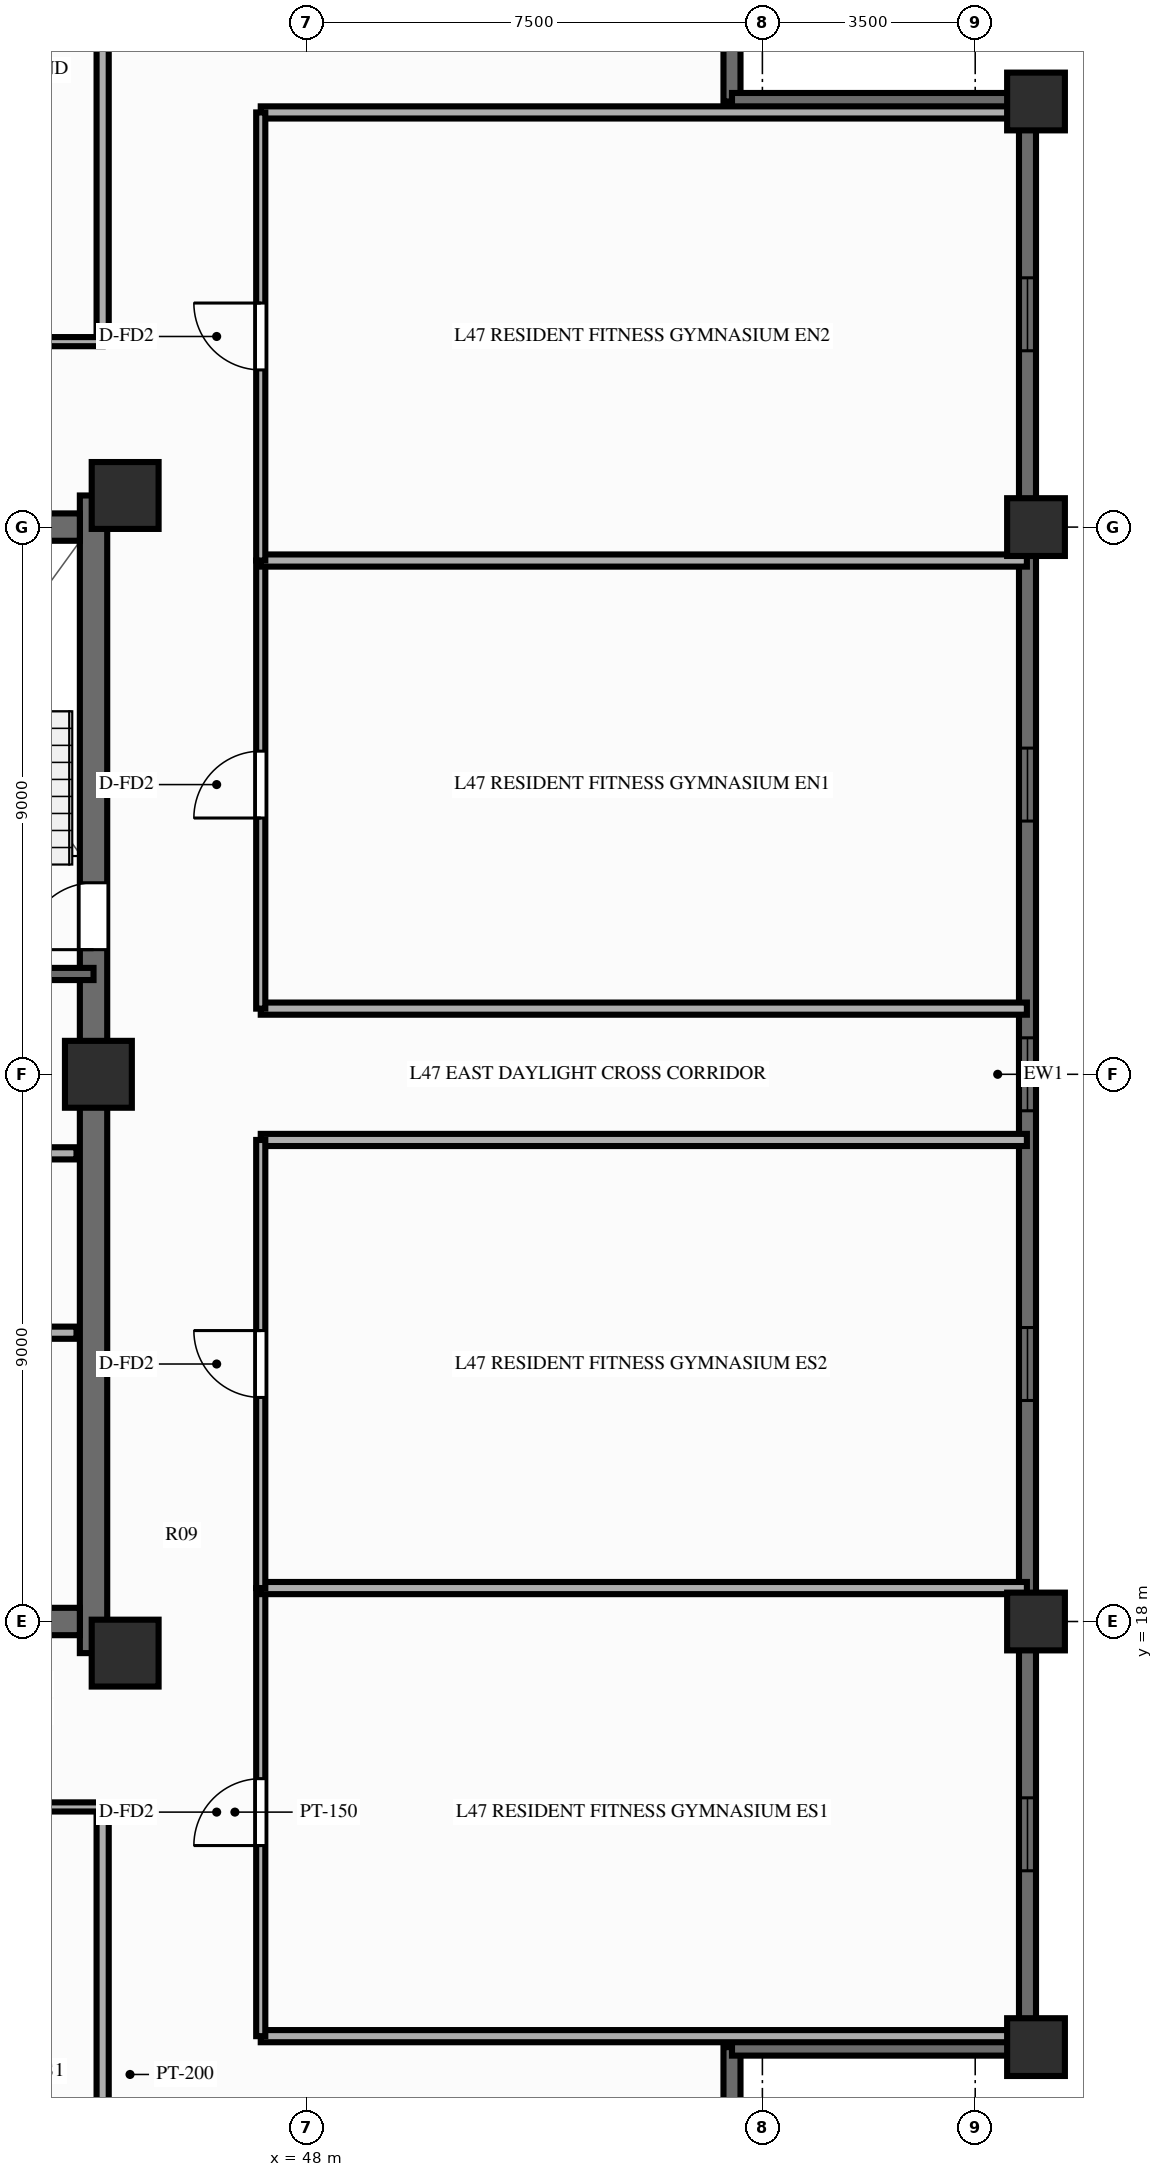
"""IFC4 building model, lengths in metres.
Left out: names, types, materials, properties, quantities, classifications, styles, units other than length and angle.
Written with IfcOpenShell. Run it as: python <this file> out.ifc"""

import sys

from ifc_helpers import new_model, si_unit, direction, frame, frame_2d, origin, origin_2d, place, context, subcontext, project, spatial, rectangle, extrude, source, transform, mapped, element, fill, save


model = new_model("IFC4")
c1 = context("Model", 3, precision=1e-05, world=origin(), true_north=direction((0.0, 1.0)))
c2 = subcontext(c1, "Body", "Model", "MODEL_VIEW")
j1 = project(units=[si_unit("LENGTHUNIT", "METRE"), si_unit("PLANEANGLEUNIT", "RADIAN")], contexts=[c1])
p1 = place(None, origin())
s1 = spatial("IfcSite", under=j1, at=p1, CompositionType="ELEMENT")
p2 = place(p1, origin())
s2 = spatial("IfcBuilding", under=s1, at=p2, CompositionType="ELEMENT")
p3 = place(p2, frame((0.0, 0.0, 148.7)))
s3 = spatial("IfcBuildingStorey", under=s2, at=p3, CompositionType="ELEMENT", Elevation=148.7)
p4 = place(p3, frame((44.5, 17.48, 0.0), z_axis=(0.0, 0.0, 1.0), x_axis=(0.0, 1.0, 0.0)))
e1 = element("IfcWall", 1, at=p4, inside=s3, PredefinedType="SHEAR", context=c2, shape_type="SweptSolid", body=[
    extrude(rectangle(XDim=19.04, YDim=0.45, at=frame_2d((9.52, 0.0))), origin(), (0.0, 0.0, 1.0), 3.5),
])
p5 = place(p4, frame((12.67, 0.0, 0.0), z_axis=(0.0, 0.0, 1.0), x_axis=(-1.0, 0.0, 0.0)))
e2 = element("IfcOpeningElement", 2, at=p5, cuts=e1, PredefinedType="OPENING", context=c2, shape_type="SweptSolid", body=[
    extrude(rectangle(XDim=1.1, YDim=2.15, at=frame_2d((0.55, 1.075))), frame((0.0, 0.237, 0.0), z_axis=(0.0, -1.0, 0.0), x_axis=(1.0, 0.0, 0.0)), (0.0, 0.0, 1.0), 0.474),
])
p6 = place(p3, frame((31.725, 18.0, 0.0), z_axis=(0.0, 0.0, 1.0), x_axis=(1.0, 0.0, 0.0)))
e3 = element("IfcWall", 3, at=p6, inside=s3, PredefinedType="SHEAR", context=c2, shape_type="SweptSolid", body=[
    extrude(rectangle(XDim=12.55, YDim=0.45, at=frame_2d((6.275, 0.0))), origin(), (0.0, 0.0, 1.0), 3.5),
])
p7 = place(p3, frame((31.725, 36.0, 0.0), z_axis=(0.0, 0.0, 1.0), x_axis=(1.0, 0.0, 0.0)))
e4 = element("IfcWall", 4, at=p7, inside=s3, PredefinedType="SHEAR", context=c2, shape_type="SweptSolid", body=[
    extrude(rectangle(XDim=12.55, YDim=0.45, at=frame_2d((6.275, 0.0))), origin(), (0.0, 0.0, 1.0), 3.5),
])
p8 = place(p7, frame((5.225, 0.0, 0.0), z_axis=(0.0, 0.0, 1.0), x_axis=(-1.0, 0.0, 0.0)))
e5 = element("IfcOpeningElement", 5, at=p8, cuts=e4, PredefinedType="OPENING", context=c2, shape_type="SweptSolid", body=[
    extrude(rectangle(XDim=1.4, YDim=2.15, at=frame_2d((0.7, 1.075))), frame((0.0, 0.237, 0.0), z_axis=(0.0, -1.0, 0.0), x_axis=(1.0, 0.0, 0.0)), (0.0, 0.0, 1.0), 0.474),
])
m1 = source(origin(), c2, "Body", "SweptSolid", [
    extrude(rectangle(XDim=1.1, YDim=1.1, at=origin_2d()), origin(), (0.0, 0.0, 1.0), 3.5),
])
for number, where, z_axis, x_axis in (
    (6, (45.02, 17.48, 0.0), (0.0, 0.0, 1.0), (1.0, 0.0, 0.0)),
    (7, (45.02, 36.52, 0.0), (0.0, 0.0, 1.0), (1.0, 0.0, 0.0)),
    (8, (44.58, 27.0, 0.0), (0.0, 0.0, 1.0), (1.0, 0.0, 0.0)),
):
    element("IfcColumn", number, at=place(p3, frame(where, z_axis=z_axis, x_axis=x_axis)), inside=s3, PredefinedType="COLUMN", context=c2, shape_type="MappedRepresentation", body=[
        mapped(m1, transform((0.0, 0.0, 0.0), scale=1.0)),
    ])
m2 = source(origin(), c2, "Body", "SweptSolid", [
    extrude(rectangle(XDim=0.95, YDim=0.95, at=origin_2d()), origin(), (0.0, 0.0, 1.0), 3.5),
])
for number, where, z_axis, x_axis in (
    (9, (60.0, 11.0, 0.0), (0.0, 0.0, 1.0), (1.0, 0.0, 0.0)),
    (10, (60.0, 18.0, 0.0), (0.0, 0.0, 1.0), (1.0, 0.0, 0.0)),
    (11, (60.0, 36.0, 0.0), (0.0, 0.0, 1.0), (1.0, 0.0, 0.0)),
    (12, (60.0, 43.0, 0.0), (0.0, 0.0, 1.0), (1.0, 0.0, 0.0)),
):
    element("IfcColumn", number, at=place(p3, frame(where, z_axis=z_axis, x_axis=x_axis)), inside=s3, PredefinedType="COLUMN", context=c2, shape_type="MappedRepresentation", body=[
        mapped(m2, transform((0.0, 0.0, 0.0), scale=1.0)),
    ])
p9 = place(p3, frame((59.86, 11.0, 0.0), z_axis=(0.0, 0.0, 1.0), x_axis=(0.0, 1.0, 0.0)))
e13 = element("IfcWall", 13, at=p9, inside=s3, PredefinedType="SOLIDWALL", context=c2, shape_type="SweptSolid", body=[
    extrude(rectangle(XDim=32.0, YDim=0.28, at=frame_2d((16.0, 0.0))), origin(), (0.0, 0.0, 1.0), 2.39),
])
p10 = place(p9, frame((2.9, 0.0, 0.25)))
e14 = element("IfcOpeningElement", 14, at=p10, cuts=e13, PredefinedType="OPENING", context=c2, shape_type="SweptSolid", body=[
    extrude(rectangle(XDim=1.2, YDim=1.5, at=frame_2d((0.6, 0.75))), frame((0.0, 0.152, 0.0), z_axis=(0.0, -1.0, 0.0), x_axis=(1.0, 0.0, 0.0)), (0.0, 0.0, 1.0), 0.304),
])
p11 = place(p9, frame((10.635, 0.0, 0.25)))
e15 = element("IfcOpeningElement", 15, at=p11, cuts=e13, PredefinedType="OPENING", context=c2, shape_type="SweptSolid", body=[
    extrude(rectangle(XDim=1.2, YDim=1.5, at=frame_2d((0.6, 0.75))), frame((0.0, 0.152, 0.0), z_axis=(0.0, -1.0, 0.0), x_axis=(1.0, 0.0, 0.0)), (0.0, 0.0, 1.0), 0.304),
])
p12 = place(p9, frame((15.4, 0.0, 0.25)))
e16 = element("IfcOpeningElement", 16, at=p12, cuts=e13, PredefinedType="OPENING", context=c2, shape_type="SweptSolid", body=[
    extrude(rectangle(XDim=1.2, YDim=1.5, at=frame_2d((0.6, 0.75))), frame((0.0, 0.152, 0.0), z_axis=(0.0, -1.0, 0.0), x_axis=(1.0, 0.0, 0.0)), (0.0, 0.0, 1.0), 0.304),
])
p13 = place(p9, frame((20.165, 0.0, 0.25)))
e17 = element("IfcOpeningElement", 17, at=p13, cuts=e13, PredefinedType="OPENING", context=c2, shape_type="SweptSolid", body=[
    extrude(rectangle(XDim=1.2, YDim=1.5, at=frame_2d((0.6, 0.75))), frame((0.0, 0.152, 0.0), z_axis=(0.0, -1.0, 0.0), x_axis=(1.0, 0.0, 0.0)), (0.0, 0.0, 1.0), 0.304),
])
p14 = place(p9, frame((27.9, 0.0, 0.25)))
e18 = element("IfcOpeningElement", 18, at=p14, cuts=e13, PredefinedType="OPENING", context=c2, shape_type="SweptSolid", body=[
    extrude(rectangle(XDim=1.2, YDim=1.5, at=frame_2d((0.6, 0.75))), frame((0.0, 0.152, 0.0), z_axis=(0.0, -1.0, 0.0), x_axis=(1.0, 0.0, 0.0)), (0.0, 0.0, 1.0), 0.304),
])
for number, where, z_axis, x_axis in (
    (19, (55.0, 6.08, 0.0), (0.0, 0.0, 1.0), (0.0, 1.0, 0.0)),
    (20, (55.0, 11.0, 0.0), (0.0, 0.0, 1.0), (1.0, 0.0, 0.0)),
    (21, (55.0, 43.0, 0.0), (0.0, 0.0, 1.0), (0.0, 1.0, 0.0)),
    (22, (55.0, 43.0, 0.0), (0.0, 0.0, 1.0), (1.0, 0.0, 0.0)),
):
    element("IfcWall", number, at=place(p3, frame(where, z_axis=z_axis, x_axis=x_axis)), inside=s3, PredefinedType="SOLIDWALL", context=c2, shape_type="SweptSolid", body=[
        extrude(rectangle(XDim=4.92, YDim=0.28, at=frame_2d((2.46, 0.0))), origin(), (0.0, 0.0, 1.0), 2.39),
    ])
p15 = place(p3, frame((41.55, 22.75, 0.0), z_axis=(0.0, 0.0, 1.0), x_axis=(1.0, 0.0, 0.0)))
e23 = element("IfcWall", 23, at=p15, inside=s3, PredefinedType="PARTITIONING", context=c2, shape_type="SweptSolid", body=[
    extrude(rectangle(XDim=2.67, YDim=0.2, at=frame_2d((1.335, 0.0))), origin(), (0.0, 0.0, 1.0), 3.16),
])
p16 = place(p3, frame((41.55, 25.7, 0.0), z_axis=(0.0, 0.0, 1.0), x_axis=(1.0, 0.0, 0.0)))
e24 = element("IfcWall", 24, at=p16, inside=s3, PredefinedType="PARTITIONING", context=c2, shape_type="SweptSolid", body=[
    extrude(rectangle(XDim=2.67, YDim=0.2, at=frame_2d((1.335, 0.0))), origin(), (0.0, 0.0, 1.0), 2.64),
])
p17 = place(p3, frame((40.57, 28.65, 0.0), z_axis=(0.0, 0.0, 1.0), x_axis=(1.0, 0.0, 0.0)))
e25 = element("IfcWall", 25, at=p17, inside=s3, PredefinedType="SOLIDWALL", context=c2, shape_type="SweptSolid", body=[
    extrude(rectangle(XDim=3.93, YDim=0.2, at=frame_2d((1.965, 0.0))), origin(), (0.0, 0.0, 1.0), 3.29),
])
p18 = place(p3, frame((44.65, 14.95, 0.0), z_axis=(0.0, 0.0, 1.0), x_axis=(0.0, -1.0, 0.0)))
e26 = element("IfcWall", 26, at=p18, inside=s3, PredefinedType="PARTITIONING", context=c2, shape_type="SweptSolid", body=[
    extrude(rectangle(XDim=8.8, YDim=0.2, at=frame_2d((4.4, 0.0))), origin(), (0.0, 0.0, 1.0), 2.39),
])
p19 = place(p3, frame((36.25, 14.95, 0.0), z_axis=(0.0, 0.0, 1.0), x_axis=(1.0, 0.0, 0.0)))
e27 = element("IfcWall", 27, at=p19, inside=s3, PredefinedType="PARTITIONING", context=c2, shape_type="SweptSolid", body=[
    extrude(rectangle(XDim=8.4, YDim=0.15, at=frame_2d((4.2, 0.0))), origin(), (0.0, 0.0, 1.0), 3.16),
])
p20 = place(p19, frame((3.367, 0.0, 0.0)))
e28 = element("IfcOpeningElement", 28, at=p20, cuts=e27, PredefinedType="OPENING", context=c2, shape_type="SweptSolid", body=[
    extrude(rectangle(XDim=1.1, YDim=2.15, at=frame_2d((0.55, 1.075))), frame((0.0, 0.087, 0.0), z_axis=(0.0, -1.0, 0.0), x_axis=(1.0, 0.0, 0.0)), (0.0, 0.0, 1.0), 0.174),
])
p21 = place(p3, frame((44.65, 39.05, 0.0), z_axis=(0.0, 0.0, 1.0), x_axis=(0.0, 1.0, 0.0)))
e29 = element("IfcWall", 29, at=p21, inside=s3, PredefinedType="PARTITIONING", context=c2, shape_type="SweptSolid", body=[
    extrude(rectangle(XDim=8.8, YDim=0.2, at=frame_2d((4.4, 0.0))), origin(), (0.0, 0.0, 1.0), 2.39),
])
p22 = place(p3, frame((38.4, 39.05, 0.0), z_axis=(0.0, 0.0, 1.0), x_axis=(1.0, 0.0, 0.0)))
e30 = element("IfcWall", 30, at=p22, inside=s3, PredefinedType="PARTITIONING", context=c2, shape_type="SweptSolid", body=[
    extrude(rectangle(XDim=6.25, YDim=0.15, at=frame_2d((3.125, 0.0))), origin(), (0.0, 0.0, 1.0), 3.16),
])
p23 = place(p22, frame((2.382, 0.0, 0.0)))
e31 = element("IfcOpeningElement", 31, at=p23, cuts=e30, PredefinedType="OPENING", context=c2, shape_type="SweptSolid", body=[
    extrude(rectangle(XDim=1.1, YDim=2.15, at=frame_2d((0.55, 1.075))), frame((0.0, 0.087, 0.0), z_axis=(0.0, -1.0, 0.0), x_axis=(1.0, 0.0, 0.0)), (0.0, 0.0, 1.0), 0.174),
])
for number, where, z_axis, x_axis in (
    (32, (47.25, 11.18, 0.0), (0.0, 0.0, 1.0), (1.0, 0.0, 0.0)),
    (33, (47.25, 25.92, 0.0), (0.0, 0.0, 1.0), (1.0, 0.0, 0.0)),
):
    element("IfcWall", number, at=place(p3, frame(where, z_axis=z_axis, x_axis=x_axis)), inside=s3, PredefinedType="PARTITIONING", context=c2, shape_type="SweptSolid", body=[
        extrude(rectangle(XDim=12.6, YDim=0.2, at=frame_2d((6.3, 0.0))), origin(), (0.0, 0.0, 1.0), 3.16),
    ])
p24 = place(p3, frame((47.25, 11.18, 0.0), z_axis=(0.0, 0.0, 1.0), x_axis=(0.0, 1.0, 0.0)))
e34 = element("IfcWall", 34, at=p24, inside=s3, PredefinedType="PARTITIONING", context=c2, shape_type="SweptSolid", body=[
    extrude(rectangle(XDim=7.37, YDim=0.15, at=frame_2d((3.685, 0.0))), origin(), (0.0, 0.0, 1.0), 3.16),
])
p25 = place(p24, frame((3.135, 0.0, 0.0)))
e35 = element("IfcOpeningElement", 35, at=p25, cuts=e34, PredefinedType="OPENING", context=c2, shape_type="SweptSolid", body=[
    extrude(rectangle(XDim=1.1, YDim=2.15, at=frame_2d((0.55, 1.075))), frame((0.0, 0.087, 0.0), z_axis=(0.0, -1.0, 0.0), x_axis=(1.0, 0.0, 0.0)), (0.0, 0.0, 1.0), 0.174),
])
p26 = place(p3, frame((47.25, 18.55, 0.0), z_axis=(0.0, 0.0, 1.0), x_axis=(1.0, 0.0, 0.0)))
e36 = element("IfcWall", 36, at=p26, inside=s3, PredefinedType="PARTITIONING", context=c2, shape_type="SweptSolid", body=[
    extrude(rectangle(XDim=12.6, YDim=0.2, at=frame_2d((6.3, 0.0))), origin(), (0.0, 0.0, 1.0), 3.16),
])
p27 = place(p3, frame((47.25, 18.55, 0.0), z_axis=(0.0, 0.0, 1.0), x_axis=(0.0, 1.0, 0.0)))
e37 = element("IfcWall", 37, at=p27, inside=s3, PredefinedType="PARTITIONING", context=c2, shape_type="SweptSolid", body=[
    extrude(rectangle(XDim=7.37, YDim=0.15, at=frame_2d((3.685, 0.0))), origin(), (0.0, 0.0, 1.0), 3.16),
])
p28 = place(p27, frame((3.135, 0.0, 0.0)))
e38 = element("IfcOpeningElement", 38, at=p28, cuts=e37, PredefinedType="OPENING", context=c2, shape_type="SweptSolid", body=[
    extrude(rectangle(XDim=1.1, YDim=2.15, at=frame_2d((0.55, 1.075))), frame((0.0, 0.087, 0.0), z_axis=(0.0, -1.0, 0.0), x_axis=(1.0, 0.0, 0.0)), (0.0, 0.0, 1.0), 0.174),
])
for number, where, z_axis, x_axis in (
    (39, (47.25, 28.08, 0.0), (0.0, 0.0, 1.0), (1.0, 0.0, 0.0)),
    (40, (47.25, 42.82, 0.0), (0.0, 0.0, 1.0), (1.0, 0.0, 0.0)),
):
    element("IfcWall", number, at=place(p3, frame(where, z_axis=z_axis, x_axis=x_axis)), inside=s3, PredefinedType="PARTITIONING", context=c2, shape_type="SweptSolid", body=[
        extrude(rectangle(XDim=12.6, YDim=0.2, at=frame_2d((6.3, 0.0))), origin(), (0.0, 0.0, 1.0), 3.16),
    ])
p29 = place(p3, frame((47.25, 28.08, 0.0), z_axis=(0.0, 0.0, 1.0), x_axis=(0.0, 1.0, 0.0)))
e41 = element("IfcWall", 41, at=p29, inside=s3, PredefinedType="PARTITIONING", context=c2, shape_type="SweptSolid", body=[
    extrude(rectangle(XDim=7.37, YDim=0.15, at=frame_2d((3.685, 0.0))), origin(), (0.0, 0.0, 1.0), 3.16),
])
p30 = place(p29, frame((3.135, 0.0, 0.0)))
e42 = element("IfcOpeningElement", 42, at=p30, cuts=e41, PredefinedType="OPENING", context=c2, shape_type="SweptSolid", body=[
    extrude(rectangle(XDim=1.1, YDim=2.15, at=frame_2d((0.55, 1.075))), frame((0.0, 0.087, 0.0), z_axis=(0.0, -1.0, 0.0), x_axis=(1.0, 0.0, 0.0)), (0.0, 0.0, 1.0), 0.174),
])
p31 = place(p3, frame((47.25, 35.45, 0.0), z_axis=(0.0, 0.0, 1.0), x_axis=(1.0, 0.0, 0.0)))
e43 = element("IfcWall", 43, at=p31, inside=s3, PredefinedType="PARTITIONING", context=c2, shape_type="SweptSolid", body=[
    extrude(rectangle(XDim=12.6, YDim=0.2, at=frame_2d((6.3, 0.0))), origin(), (0.0, 0.0, 1.0), 3.16),
])
p32 = place(p3, frame((47.25, 35.45, 0.0), z_axis=(0.0, 0.0, 1.0), x_axis=(0.0, 1.0, 0.0)))
e44 = element("IfcWall", 44, at=p32, inside=s3, PredefinedType="PARTITIONING", context=c2, shape_type="SweptSolid", body=[
    extrude(rectangle(XDim=7.37, YDim=0.15, at=frame_2d((3.685, 0.0))), origin(), (0.0, 0.0, 1.0), 3.16),
])
p33 = place(p32, frame((3.135, 0.0, 0.0)))
e45 = element("IfcOpeningElement", 45, at=p33, cuts=e44, PredefinedType="OPENING", context=c2, shape_type="SweptSolid", body=[
    extrude(rectangle(XDim=1.1, YDim=2.15, at=frame_2d((0.55, 1.075))), frame((0.0, 0.087, 0.0), z_axis=(0.0, -1.0, 0.0), x_axis=(1.0, 0.0, 0.0)), (0.0, 0.0, 1.0), 0.174),
])
m3 = source(origin(), c2, "Body", "SweptSolid", [
    extrude(rectangle(XDim=1.2, YDim=1.5, at=frame_2d((0.6, 0.75))), frame((0.0, 0.03, 0.0), z_axis=(0.0, -1.0, 0.0), x_axis=(1.0, 0.0, 0.0)), (0.0, 0.0, 1.0), 0.06),
])
p34 = place(p10, origin())
e46 = element("IfcWindow", 46, at=p34, inside=s3, PartitioningType="SINGLE_PANEL", PredefinedType="WINDOW", context=c2, shape_type="MappedRepresentation", body=[
    mapped(m3, transform((0.0, 0.0, 0.0), scale=1.0)),
])
fill(e14, e46)
p35 = place(p11, origin())
e47 = element("IfcWindow", 47, at=p35, inside=s3, PartitioningType="SINGLE_PANEL", PredefinedType="WINDOW", context=c2, shape_type="MappedRepresentation", body=[
    mapped(m3, transform((0.0, 0.0, 0.0), scale=1.0)),
])
fill(e15, e47)
p36 = place(p12, origin())
e48 = element("IfcWindow", 48, at=p36, inside=s3, PartitioningType="SINGLE_PANEL", PredefinedType="WINDOW", context=c2, shape_type="MappedRepresentation", body=[
    mapped(m3, transform((0.0, 0.0, 0.0), scale=1.0)),
])
fill(e16, e48)
p37 = place(p13, origin())
e49 = element("IfcWindow", 49, at=p37, inside=s3, PartitioningType="SINGLE_PANEL", PredefinedType="WINDOW", context=c2, shape_type="MappedRepresentation", body=[
    mapped(m3, transform((0.0, 0.0, 0.0), scale=1.0)),
])
fill(e17, e49)
p38 = place(p14, origin())
e50 = element("IfcWindow", 50, at=p38, inside=s3, PartitioningType="SINGLE_PANEL", PredefinedType="WINDOW", context=c2, shape_type="MappedRepresentation", body=[
    mapped(m3, transform((0.0, 0.0, 0.0), scale=1.0)),
])
fill(e18, e50)
m4 = source(origin(), c2, "Body", "SweptSolid", [
    extrude(rectangle(XDim=1.1, YDim=2.15, at=frame_2d((0.55, 1.075))), frame((0.0, 0.025, 0.0), z_axis=(0.0, -1.0, 0.0), x_axis=(1.0, 0.0, 0.0)), (0.0, 0.0, 1.0), 0.05),
])
p39 = place(p5, origin())
e51 = element("IfcDoor", 51, at=p39, inside=s3, OperationType="SINGLE_SWING_RIGHT", PredefinedType="DOOR", context=c2, shape_type="MappedRepresentation", body=[
    mapped(m4, transform((0.0, 0.0, 0.0), scale=1.0)),
])
fill(e2, e51)
p40 = place(p25, origin())
e52 = element("IfcDoor", 52, at=p40, inside=s3, OperationType="SINGLE_SWING_LEFT", PredefinedType="DOOR", context=c2, shape_type="MappedRepresentation", body=[
    mapped(m4, transform((0.0, 0.0, 0.0), scale=1.0)),
])
fill(e35, e52)
p41 = place(p28, origin())
e53 = element("IfcDoor", 53, at=p41, inside=s3, OperationType="SINGLE_SWING_RIGHT", PredefinedType="DOOR", context=c2, shape_type="MappedRepresentation", body=[
    mapped(m4, transform((0.0, 0.0, 0.0), scale=1.0)),
])
fill(e38, e53)
p42 = place(p30, origin())
e54 = element("IfcDoor", 54, at=p42, inside=s3, OperationType="SINGLE_SWING_LEFT", PredefinedType="DOOR", context=c2, shape_type="MappedRepresentation", body=[
    mapped(m4, transform((0.0, 0.0, 0.0), scale=1.0)),
])
fill(e42, e54)
p43 = place(p33, origin())
e55 = element("IfcDoor", 55, at=p43, inside=s3, OperationType="SINGLE_SWING_RIGHT", PredefinedType="DOOR", context=c2, shape_type="MappedRepresentation", body=[
    mapped(m4, transform((0.0, 0.0, 0.0), scale=1.0)),
])
fill(e45, e55)
save(model, sys.argv[1])
